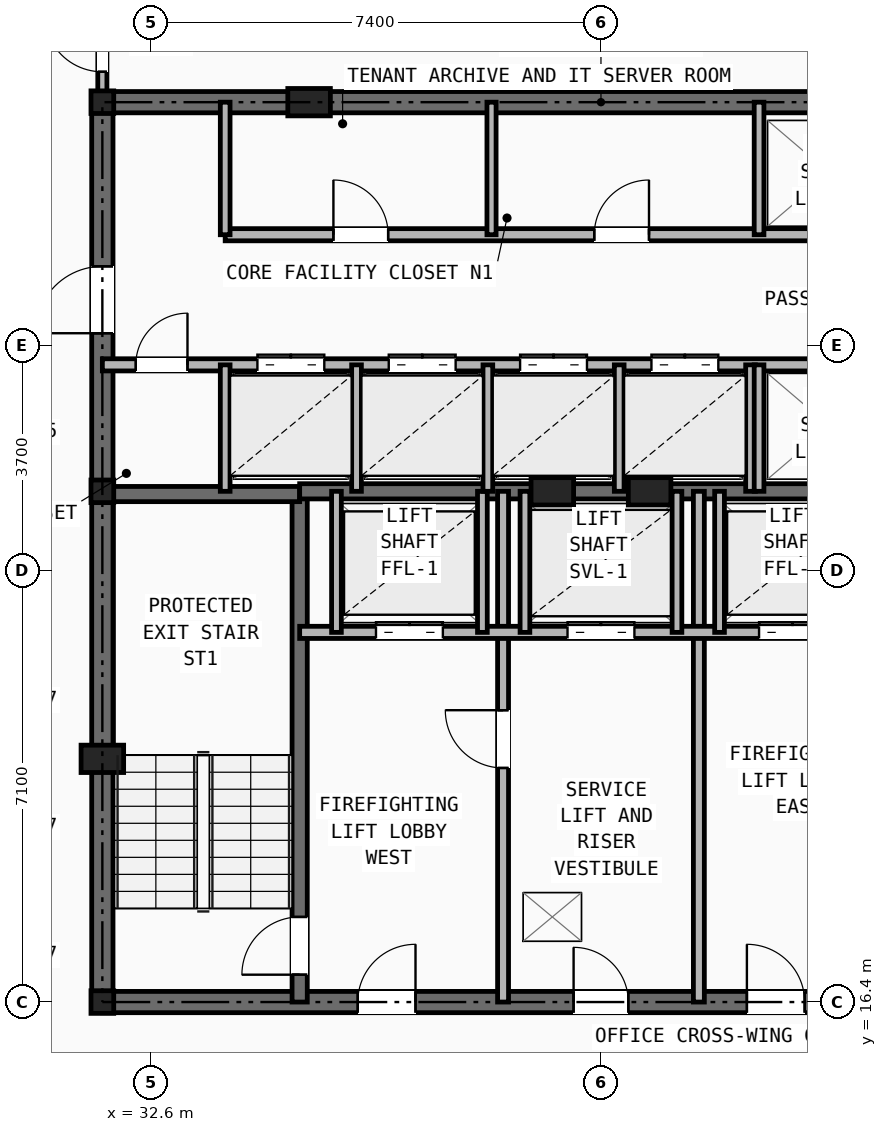
"""IFC4 building model, lengths in metres.
Left out: names, types, materials, properties, quantities, classifications, styles, units other than length and angle.
Written with IfcOpenShell. Run it as: python <this file> out.ifc"""

import sys

from ifc_helpers import new_model, si_unit, direction, frame, frame_2d, origin, origin_2d, place, context, subcontext, project, spatial, rectangle, i_section, extrude, element, fill, save


model = new_model("IFC4")
c1 = context("Model", 3, precision=1e-05, world=origin(), true_north=direction((0.0, 1.0)))
c2 = subcontext(c1, "Body", "Model", "MODEL_VIEW")
j1 = project(units=[si_unit("LENGTHUNIT", "METRE"), si_unit("PLANEANGLEUNIT", "RADIAN")], contexts=[c1])
p1 = place(None, origin())
s1 = spatial("IfcSite", under=j1, at=p1, CompositionType="ELEMENT")
p2 = place(p1, origin())
s2 = spatial("IfcBuilding", under=s1, at=p2, CompositionType="ELEMENT")
p3 = place(p2, frame((0.0, 0.0, 189.6)))
s3 = spatial("IfcBuildingStorey", under=s2, at=p3, CompositionType="ELEMENT", Elevation=189.6)
for number, where, z_axis, x_axis in (
    (1, (31.8, 16.4, 0.0), (0.0, 0.0, 1.0), (1.0, 0.0, 0.0)),
    (2, (31.8, 24.8, 0.0), (0.0, 0.0, 1.0), (1.0, 0.0, 0.0)),
    (3, (31.8, 31.2, 0.0), (0.0, 0.0, 1.0), (1.0, 0.0, 0.0)),
):
    element("IfcColumn", number, at=place(p3, frame(where, z_axis=z_axis, x_axis=x_axis)), inside=s3, PredefinedType="COLUMN", context=c2, shape_type="SweptSolid", body=[
        extrude(i_section(OverallWidth=0.374, OverallDepth=0.372, WebThickness=0.016, FlangeThickness=0.026, at=origin_2d()), origin(), (0.0, 0.0, 1.0), 3.45),
    ])
for number, where, z_axis, x_axis in (
    (4, (31.8, 20.4, 0.0), (0.0, 0.0, 1.0), (1.0, 0.0, 0.0)),
    (5, (35.2, 31.2, 0.0), (0.0, 0.0, 1.0), (1.0, 0.0, 0.0)),
    (6, (39.2, 24.8, 0.0), (0.0, 0.0, 1.0), (1.0, 0.0, 0.0)),
    (7, (40.8, 24.8, 0.0), (0.0, 0.0, 1.0), (1.0, 0.0, 0.0)),
):
    element("IfcColumn", number, at=place(p3, frame(where, z_axis=z_axis, x_axis=x_axis)), inside=s3, PredefinedType="PILASTER", context=c2, shape_type="SweptSolid", body=[
        extrude(rectangle(XDim=0.7, YDim=0.45, at=origin_2d()), origin(), (0.0, 0.0, 1.0), 3.45),
    ])
p4 = place(p3, frame((31.8, 16.4, 0.0), z_axis=(0.0, 0.0, 1.0), x_axis=(1.0, 0.0, 0.0)))
e8 = element("IfcWall", 8, at=p4, inside=s3, PredefinedType="SHEAR", context=c2, shape_type="SweptSolid", body=[
    extrude(rectangle(XDim=16.4, YDim=0.35, at=frame_2d((8.2, 0.0))), origin(), (0.0, 0.0, 1.0), 3.21),
])
p5 = place(p4, frame((7.75, 0.0, 0.0)))
e9 = element("IfcOpeningElement", 9, at=p5, cuts=e8, PredefinedType="OPENING", context=c2, shape_type="SweptSolid", body=[
    extrude(rectangle(XDim=0.9, YDim=2.1, at=frame_2d((0.45, 1.05))), frame((0.0, 0.185, 0.0), z_axis=(0.0, -1.0, 0.0), x_axis=(1.0, 0.0, 0.0)), (0.0, 0.0, 1.0), 0.37),
])
p6 = place(p4, frame((4.2, 0.0, 0.0)))
e10 = element("IfcOpeningElement", 10, at=p6, cuts=e8, PredefinedType="OPENING", context=c2, shape_type="SweptSolid", body=[
    extrude(rectangle(XDim=0.95, YDim=2.1, at=frame_2d((0.475, 1.05))), frame((0.0, 0.185, 0.0), z_axis=(0.0, -1.0, 0.0), x_axis=(1.0, 0.0, 0.0)), (0.0, 0.0, 1.0), 0.37),
])
p7 = place(p4, frame((10.6, 0.0, 0.0)))
e11 = element("IfcOpeningElement", 11, at=p7, cuts=e8, PredefinedType="OPENING", context=c2, shape_type="SweptSolid", body=[
    extrude(rectangle(XDim=0.95, YDim=2.1, at=frame_2d((0.475, 1.05))), frame((0.0, 0.185, 0.0), z_axis=(0.0, -1.0, 0.0), x_axis=(1.0, 0.0, 0.0)), (0.0, 0.0, 1.0), 0.37),
])
p8 = place(p3, frame((31.8, 31.2, 0.0), z_axis=(0.0, 0.0, 1.0), x_axis=(1.0, 0.0, 0.0)))
e12 = element("IfcWall", 12, at=p8, inside=s3, PredefinedType="SHEAR", context=c2, shape_type="SweptSolid", body=[
    extrude(rectangle(XDim=16.4, YDim=0.35, at=frame_2d((8.2, 0.0))), origin(), (0.0, 0.0, 1.0), 3.21),
])
p9 = place(p3, frame((31.8, 16.4, 0.0), z_axis=(0.0, 0.0, 1.0), x_axis=(0.0, 1.0, 0.0)))
e13 = element("IfcWall", 13, at=p9, inside=s3, PredefinedType="SHEAR", context=c2, shape_type="SweptSolid", body=[
    extrude(rectangle(XDim=14.8, YDim=0.35, at=frame_2d((7.4, 0.0))), origin(), (0.0, 0.0, 1.0), 3.21),
])
p10 = place(p9, frame((11.0, 0.0, 0.0)))
e14 = element("IfcOpeningElement", 14, at=p10, cuts=e13, PredefinedType="OPENING", context=c2, shape_type="SweptSolid", body=[
    extrude(rectangle(XDim=1.1, YDim=2.15, at=frame_2d((0.55, 1.075))), frame((0.0, 0.185, 0.0), z_axis=(0.0, -1.0, 0.0), x_axis=(1.0, 0.0, 0.0)), (0.0, 0.0, 1.0), 0.37),
])
p11 = place(p3, frame((35.045, 16.4, 0.0), z_axis=(0.0, 0.0, 1.0), x_axis=(0.0, 1.0, 0.0)))
e15 = element("IfcWall", 15, at=p11, inside=s3, PredefinedType="SHEAR", context=c2, shape_type="SweptSolid", body=[
    extrude(rectangle(XDim=8.4, YDim=0.25, at=frame_2d((4.2, 0.0))), origin(), (0.0, 0.0, 1.0), 3.21),
])
p12 = place(p11, frame((0.45, 0.0, 0.0)))
e16 = element("IfcOpeningElement", 16, at=p12, cuts=e15, PredefinedType="OPENING", context=c2, shape_type="SweptSolid", body=[
    extrude(rectangle(XDim=0.95, YDim=2.1, at=frame_2d((0.475, 1.05))), frame((0.0, 0.135, 0.0), z_axis=(0.0, -1.0, 0.0), x_axis=(1.0, 0.0, 0.0)), (0.0, 0.0, 1.0), 0.27),
])
p13 = place(p3, frame((31.8, 24.755, 0.0), z_axis=(0.0, 0.0, 1.0), x_axis=(1.0, 0.0, 0.0)))
e17 = element("IfcWall", 17, at=p13, inside=s3, PredefinedType="SHEAR", context=c2, shape_type="SweptSolid", body=[
    extrude(rectangle(XDim=3.245, YDim=0.25, at=frame_2d((1.623, 0.0))), origin(), (0.0, 0.0, 1.0), 3.21),
])
p14 = place(p3, frame((35.045, 24.8, 0.0), z_axis=(0.0, 0.0, 1.0), x_axis=(1.0, 0.0, 0.0)))
e18 = element("IfcWall", 18, at=p14, inside=s3, PredefinedType="SHEAR", context=c2, shape_type="SweptSolid", body=[
    extrude(rectangle(XDim=9.91, YDim=0.25, at=frame_2d((4.955, 0.0))), origin(), (0.0, 0.0, 1.0), 3.21),
])
p15 = place(p3, frame((38.39, 16.4, 0.0), z_axis=(0.0, 0.0, 1.0), x_axis=(0.0, 1.0, 0.0)))
e19 = element("IfcWall", 19, at=p15, inside=s3, PredefinedType="PARTITIONING", context=c2, shape_type="SweptSolid", body=[
    extrude(rectangle(XDim=8.4, YDim=0.18, at=frame_2d((4.2, 0.0))), origin(), (0.0, 0.0, 1.0), 2.665),
])
p16 = place(p15, frame((3.85, 0.0, 0.0)))
e20 = element("IfcOpeningElement", 20, at=p16, cuts=e19, PredefinedType="OPENING", context=c2, shape_type="SweptSolid", body=[
    extrude(rectangle(XDim=0.95, YDim=2.1, at=frame_2d((0.475, 1.05))), frame((0.0, 0.1, 0.0), z_axis=(0.0, -1.0, 0.0), x_axis=(1.0, 0.0, 0.0)), (0.0, 0.0, 1.0), 0.2),
])
p17 = place(p3, frame((41.61, 16.4, 0.0), z_axis=(0.0, 0.0, 1.0), x_axis=(0.0, 1.0, 0.0)))
e21 = element("IfcWall", 21, at=p17, inside=s3, PredefinedType="PARTITIONING", context=c2, shape_type="SweptSolid", body=[
    extrude(rectangle(XDim=8.4, YDim=0.18, at=frame_2d((4.2, 0.0))), origin(), (0.0, 0.0, 1.0), 2.665),
])
p18 = place(p3, frame((35.045, 22.48, 0.0), z_axis=(0.0, 0.0, 1.0), x_axis=(1.0, 0.0, 0.0)))
e22 = element("IfcWall", 22, at=p18, inside=s3, PredefinedType="SOLIDWALL", context=c2, shape_type="SweptSolid", body=[
    extrude(rectangle(XDim=9.91, YDim=0.2, at=frame_2d((4.955, 0.0))), origin(), (0.0, 0.0, 1.0), 3.21),
])
p19 = place(p18, frame((1.255, 0.0, 0.0)))
e23 = element("IfcOpeningElement", 23, at=p19, cuts=e22, PredefinedType="OPENING", context=c2, shape_type="SweptSolid", body=[
    extrude(rectangle(XDim=1.1, YDim=2.15, at=frame_2d((0.55, 1.075))), frame((0.0, 0.11, 0.0), z_axis=(0.0, -1.0, 0.0), x_axis=(1.0, 0.0, 0.0)), (0.0, 0.0, 1.0), 0.22),
])
p20 = place(p18, frame((7.555, 0.0, 0.0)))
e24 = element("IfcOpeningElement", 24, at=p20, cuts=e22, PredefinedType="OPENING", context=c2, shape_type="SweptSolid", body=[
    extrude(rectangle(XDim=1.1, YDim=2.15, at=frame_2d((0.55, 1.075))), frame((0.0, 0.11, 0.0), z_axis=(0.0, -1.0, 0.0), x_axis=(1.0, 0.0, 0.0)), (0.0, 0.0, 1.0), 0.22),
])
p21 = place(p18, frame((4.405, 0.0, 0.0)))
e25 = element("IfcOpeningElement", 25, at=p21, cuts=e22, PredefinedType="OPENING", context=c2, shape_type="SweptSolid", body=[
    extrude(rectangle(XDim=1.1, YDim=2.15, at=frame_2d((0.55, 1.075))), frame((0.0, 0.11, 0.0), z_axis=(0.0, -1.0, 0.0), x_axis=(1.0, 0.0, 0.0)), (0.0, 0.0, 1.0), 0.22),
])
for number, where, z_axis, x_axis in (
    (26, (35.65, 22.48, 0.0), (0.0, 0.0, 1.0), (0.0, 1.0, 0.0)),
    (27, (38.05, 22.48, 0.0), (0.0, 0.0, 1.0), (0.0, 1.0, 0.0)),
    (28, (41.95, 22.48, 0.0), (0.0, 0.0, 1.0), (0.0, 1.0, 0.0)),
    (29, (38.75, 22.48, 0.0), (0.0, 0.0, 1.0), (0.0, 1.0, 0.0)),
    (30, (41.25, 22.48, 0.0), (0.0, 0.0, 1.0), (0.0, 1.0, 0.0)),
):
    element("IfcWall", number, at=place(p3, frame(where, z_axis=z_axis, x_axis=x_axis)), inside=s3, PredefinedType="SOLIDWALL", context=c2, shape_type="SweptSolid", body=[
        extrude(rectangle(XDim=2.32, YDim=0.16, at=frame_2d((1.16, 0.0))), origin(), (0.0, 0.0, 1.0), 3.21),
    ])
p22 = place(p3, frame((33.82, 29.02, 0.0), z_axis=(0.0, 0.0, 1.0), x_axis=(1.0, 0.0, 0.0)))
e31 = element("IfcWall", 31, at=p22, inside=s3, PredefinedType="SOLIDWALL", context=c2, shape_type="SweptSolid", body=[
    extrude(rectangle(XDim=14.38, YDim=0.2, at=frame_2d((7.19, 0.0))), origin(), (0.0, 0.0, 1.0), 2.665),
])
p23 = place(p22, frame((1.78, 0.0, 0.0)))
e32 = element("IfcOpeningElement", 32, at=p23, cuts=e31, PredefinedType="OPENING", context=c2, shape_type="SweptSolid", body=[
    extrude(rectangle(XDim=0.9, YDim=2.1, at=frame_2d((0.45, 1.05))), frame((0.0, 0.11, 0.0), z_axis=(0.0, -1.0, 0.0), x_axis=(1.0, 0.0, 0.0)), (0.0, 0.0, 1.0), 0.22),
])
p24 = place(p22, frame((6.07, 0.0, 0.0)))
e33 = element("IfcOpeningElement", 33, at=p24, cuts=e31, PredefinedType="OPENING", context=c2, shape_type="SweptSolid", body=[
    extrude(rectangle(XDim=0.9, YDim=2.1, at=frame_2d((0.45, 1.05))), frame((0.0, 0.11, 0.0), z_axis=(0.0, -1.0, 0.0), x_axis=(1.0, 0.0, 0.0)), (0.0, 0.0, 1.0), 0.22),
])
p25 = place(p3, frame((31.8, 26.88, 0.0), z_axis=(0.0, 0.0, 1.0), x_axis=(1.0, 0.0, 0.0)))
e34 = element("IfcWall", 34, at=p25, inside=s3, PredefinedType="SOLIDWALL", context=c2, shape_type="SweptSolid", body=[
    extrude(rectangle(XDim=16.4, YDim=0.2, at=frame_2d((8.2, 0.0))), origin(), (0.0, 0.0, 1.0), 2.665),
])
p26 = place(p25, frame((0.55, 0.0, 0.0)))
e35 = element("IfcOpeningElement", 35, at=p26, cuts=e34, PredefinedType="OPENING", context=c2, shape_type="SweptSolid", body=[
    extrude(rectangle(XDim=0.85, YDim=2.05, at=frame_2d((0.425, 1.025))), frame((0.0, 0.11, 0.0), z_axis=(0.0, -1.0, 0.0), x_axis=(1.0, 0.0, 0.0)), (0.0, 0.0, 1.0), 0.22),
])
p27 = place(p25, frame((2.55, 0.0, 0.0)))
e36 = element("IfcOpeningElement", 36, at=p27, cuts=e34, PredefinedType="OPENING", context=c2, shape_type="SweptSolid", body=[
    extrude(rectangle(XDim=1.1, YDim=2.15, at=frame_2d((0.55, 1.075))), frame((0.0, 0.11, 0.0), z_axis=(0.0, -1.0, 0.0), x_axis=(1.0, 0.0, 0.0)), (0.0, 0.0, 1.0), 0.22),
])
p28 = place(p25, frame((4.71, 0.0, 0.0)))
e37 = element("IfcOpeningElement", 37, at=p28, cuts=e34, PredefinedType="OPENING", context=c2, shape_type="SweptSolid", body=[
    extrude(rectangle(XDim=1.1, YDim=2.15, at=frame_2d((0.55, 1.075))), frame((0.0, 0.11, 0.0), z_axis=(0.0, -1.0, 0.0), x_axis=(1.0, 0.0, 0.0)), (0.0, 0.0, 1.0), 0.22),
])
p29 = place(p25, frame((6.87, 0.0, 0.0)))
e38 = element("IfcOpeningElement", 38, at=p29, cuts=e34, PredefinedType="OPENING", context=c2, shape_type="SweptSolid", body=[
    extrude(rectangle(XDim=1.1, YDim=2.15, at=frame_2d((0.55, 1.075))), frame((0.0, 0.11, 0.0), z_axis=(0.0, -1.0, 0.0), x_axis=(1.0, 0.0, 0.0)), (0.0, 0.0, 1.0), 0.22),
])
p30 = place(p25, frame((9.03, 0.0, 0.0)))
e39 = element("IfcOpeningElement", 39, at=p30, cuts=e34, PredefinedType="OPENING", context=c2, shape_type="SweptSolid", body=[
    extrude(rectangle(XDim=1.1, YDim=2.15, at=frame_2d((0.55, 1.075))), frame((0.0, 0.11, 0.0), z_axis=(0.0, -1.0, 0.0), x_axis=(1.0, 0.0, 0.0)), (0.0, 0.0, 1.0), 0.22),
])
p31 = place(p3, frame((33.82, 29.02, 0.0), z_axis=(0.0, 0.0, 1.0), x_axis=(0.0, 1.0, 0.0)))
e40 = element("IfcWall", 40, at=p31, inside=s3, PredefinedType="SOLIDWALL", context=c2, shape_type="SweptSolid", body=[
    extrude(rectangle(XDim=2.18, YDim=0.16, at=frame_2d((1.09, 0.0))), origin(), (0.0, 0.0, 1.0), 2.665),
])
p32 = place(p3, frame((33.82, 24.8, 0.0), z_axis=(0.0, 0.0, 1.0), x_axis=(0.0, 1.0, 0.0)))
e41 = element("IfcWall", 41, at=p32, inside=s3, PredefinedType="SOLIDWALL", context=c2, shape_type="SweptSolid", body=[
    extrude(rectangle(XDim=2.08, YDim=0.16, at=frame_2d((1.04, 0.0))), origin(), (0.0, 0.0, 1.0), 3.21),
])
p33 = place(p3, frame((38.2, 29.02, 0.0), z_axis=(0.0, 0.0, 1.0), x_axis=(0.0, 1.0, 0.0)))
e42 = element("IfcWall", 42, at=p33, inside=s3, PredefinedType="PARTITIONING", context=c2, shape_type="SweptSolid", body=[
    extrude(rectangle(XDim=2.18, YDim=0.15, at=frame_2d((1.09, 0.0))), origin(), (0.0, 0.0, 1.0), 2.665),
])
for number, where, z_axis, x_axis in (
    (43, (35.98, 24.8, 0.0), (0.0, 0.0, 1.0), (0.0, 1.0, 0.0)),
    (44, (38.14, 24.8, 0.0), (0.0, 0.0, 1.0), (0.0, 1.0, 0.0)),
    (45, (40.3, 24.8, 0.0), (0.0, 0.0, 1.0), (0.0, 1.0, 0.0)),
    (46, (42.46, 24.8, 0.0), (0.0, 0.0, 1.0), (0.0, 1.0, 0.0)),
):
    element("IfcWall", number, at=place(p3, frame(where, z_axis=z_axis, x_axis=x_axis)), inside=s3, PredefinedType="SOLIDWALL", context=c2, shape_type="SweptSolid", body=[
        extrude(rectangle(XDim=2.08, YDim=0.16, at=frame_2d((1.04, 0.0))), origin(), (0.0, 0.0, 1.0), 3.21),
    ])
p34 = place(p3, frame((42.6, 29.02, 0.0), z_axis=(0.0, 0.0, 1.0), x_axis=(0.0, 1.0, 0.0)))
e47 = element("IfcWall", 47, at=p34, inside=s3, PredefinedType="SOLIDWALL", context=c2, shape_type="SweptSolid", body=[
    extrude(rectangle(XDim=2.18, YDim=0.16, at=frame_2d((1.09, 0.0))), origin(), (0.0, 0.0, 1.0), 2.665),
])
p35 = place(p3, frame((42.6, 24.8, 0.0), z_axis=(0.0, 0.0, 1.0), x_axis=(0.0, 1.0, 0.0)))
e48 = element("IfcWall", 48, at=p35, inside=s3, PredefinedType="SOLIDWALL", context=c2, shape_type="SweptSolid", body=[
    extrude(rectangle(XDim=2.08, YDim=0.16, at=frame_2d((1.04, 0.0))), origin(), (0.0, 0.0, 1.0), 3.21),
])
p36 = place(p3, frame((31.8, 31.2, 0.0), z_axis=(0.0, 0.0, 1.0), x_axis=(0.0, 1.0, 0.0)))
e49 = element("IfcWall", 49, at=p36, inside=s3, PredefinedType="PARTITIONING", context=c2, shape_type="SweptSolid", body=[
    extrude(rectangle(XDim=5.3, YDim=0.15, at=frame_2d((2.65, 0.0))), origin(), (0.0, 0.0, 1.0), 2.225),
])
p37 = place(p36, frame((0.5, 0.0, 0.0)))
e50 = element("IfcOpeningElement", 50, at=p37, cuts=e49, PredefinedType="OPENING", context=c2, shape_type="SweptSolid", body=[
    extrude(rectangle(XDim=0.95, YDim=2.1, at=frame_2d((0.475, 1.05))), frame((0.0, 0.085, 0.0), z_axis=(0.0, -1.0, 0.0), x_axis=(1.0, 0.0, 0.0)), (0.0, 0.0, 1.0), 0.17),
])
p38 = place(p5, origin())
e51 = element("IfcDoor", 51, at=p38, inside=s3, OperationType="SINGLE_SWING_LEFT", PredefinedType="DOOR", context=c2, shape_type="SweptSolid", body=[
    extrude(rectangle(XDim=0.9, YDim=2.1, at=frame_2d((0.45, 1.05))), frame((0.0, 0.025, 0.0), z_axis=(0.0, -1.0, 0.0), x_axis=(1.0, 0.0, 0.0)), (0.0, 0.0, 1.0), 0.05),
])
fill(e9, e51)
p39 = place(p16, origin())
e52 = element("IfcDoor", 52, at=p39, inside=s3, OperationType="SINGLE_SWING_RIGHT", PredefinedType="DOOR", context=c2, shape_type="SweptSolid", body=[
    extrude(rectangle(XDim=0.95, YDim=2.1, at=frame_2d((0.475, 1.05))), frame((0.0, 0.025, 0.0), z_axis=(0.0, -1.0, 0.0), x_axis=(1.0, 0.0, 0.0)), (0.0, 0.0, 1.0), 0.05),
])
fill(e20, e52)
p40 = place(p12, origin())
e53 = element("IfcDoor", 53, at=p40, inside=s3, OperationType="SINGLE_SWING_LEFT", PredefinedType="DOOR", context=c2, shape_type="SweptSolid", body=[
    extrude(rectangle(XDim=0.95, YDim=2.1, at=frame_2d((0.475, 1.05))), frame((0.0, 0.025, 0.0), z_axis=(0.0, -1.0, 0.0), x_axis=(1.0, 0.0, 0.0)), (0.0, 0.0, 1.0), 0.05),
])
fill(e16, e53)
p41 = place(p6, origin())
e54 = element("IfcDoor", 54, at=p41, inside=s3, OperationType="SINGLE_SWING_RIGHT", PredefinedType="DOOR", context=c2, shape_type="SweptSolid", body=[
    extrude(rectangle(XDim=0.95, YDim=2.1, at=frame_2d((0.475, 1.05))), frame((0.0, 0.025, 0.0), z_axis=(0.0, -1.0, 0.0), x_axis=(1.0, 0.0, 0.0)), (0.0, 0.0, 1.0), 0.05),
])
fill(e10, e54)
p42 = place(p7, origin())
e55 = element("IfcDoor", 55, at=p42, inside=s3, OperationType="SINGLE_SWING_LEFT", PredefinedType="DOOR", context=c2, shape_type="SweptSolid", body=[
    extrude(rectangle(XDim=0.95, YDim=2.1, at=frame_2d((0.475, 1.05))), frame((0.0, 0.025, 0.0), z_axis=(0.0, -1.0, 0.0), x_axis=(1.0, 0.0, 0.0)), (0.0, 0.0, 1.0), 0.05),
])
fill(e11, e55)
p43 = place(p19, origin())
e56 = element("IfcDoor", 56, at=p43, inside=s3, OperationType="DOUBLE_DOOR_SLIDING", PredefinedType="DOOR", context=c2, shape_type="SweptSolid", body=[
    extrude(rectangle(XDim=1.1, YDim=2.15, at=frame_2d((0.55, 1.075))), frame((0.0, 0.025, 0.0), z_axis=(0.0, -1.0, 0.0), x_axis=(1.0, 0.0, 0.0)), (0.0, 0.0, 1.0), 0.05),
])
fill(e23, e56)
p44 = place(p20, origin())
e57 = element("IfcDoor", 57, at=p44, inside=s3, OperationType="DOUBLE_DOOR_SLIDING", PredefinedType="DOOR", context=c2, shape_type="SweptSolid", body=[
    extrude(rectangle(XDim=1.1, YDim=2.15, at=frame_2d((0.55, 1.075))), frame((0.0, 0.025, 0.0), z_axis=(0.0, -1.0, 0.0), x_axis=(1.0, 0.0, 0.0)), (0.0, 0.0, 1.0), 0.05),
])
fill(e24, e57)
p45 = place(p21, origin())
e58 = element("IfcDoor", 58, at=p45, inside=s3, OperationType="DOUBLE_DOOR_SLIDING", PredefinedType="DOOR", context=c2, shape_type="SweptSolid", body=[
    extrude(rectangle(XDim=1.1, YDim=2.15, at=frame_2d((0.55, 1.075))), frame((0.0, 0.025, 0.0), z_axis=(0.0, -1.0, 0.0), x_axis=(1.0, 0.0, 0.0)), (0.0, 0.0, 1.0), 0.05),
])
fill(e25, e58)
p46 = place(p26, origin())
e59 = element("IfcDoor", 59, at=p46, inside=s3, OperationType="SINGLE_SWING_RIGHT", PredefinedType="DOOR", context=c2, shape_type="SweptSolid", body=[
    extrude(rectangle(XDim=0.85, YDim=2.05, at=frame_2d((0.425, 1.025))), frame((0.0, 0.025, 0.0), z_axis=(0.0, -1.0, 0.0), x_axis=(1.0, 0.0, 0.0)), (0.0, 0.0, 1.0), 0.05),
])
fill(e35, e59)
p47 = place(p10, origin())
e60 = element("IfcDoor", 60, at=p47, inside=s3, OperationType="SINGLE_SWING_LEFT", PredefinedType="DOOR", context=c2, shape_type="SweptSolid", body=[
    extrude(rectangle(XDim=1.1, YDim=2.15, at=frame_2d((0.55, 1.075))), frame((0.0, 0.025, 0.0), z_axis=(0.0, -1.0, 0.0), x_axis=(1.0, 0.0, 0.0)), (0.0, 0.0, 1.0), 0.05),
])
fill(e14, e60)
p48 = place(p23, origin())
e61 = element("IfcDoor", 61, at=p48, inside=s3, OperationType="SINGLE_SWING_LEFT", PredefinedType="DOOR", context=c2, shape_type="SweptSolid", body=[
    extrude(rectangle(XDim=0.9, YDim=2.1, at=frame_2d((0.45, 1.05))), frame((0.0, 0.025, 0.0), z_axis=(0.0, -1.0, 0.0), x_axis=(1.0, 0.0, 0.0)), (0.0, 0.0, 1.0), 0.05),
])
fill(e32, e61)
p49 = place(p24, origin())
e62 = element("IfcDoor", 62, at=p49, inside=s3, OperationType="SINGLE_SWING_RIGHT", PredefinedType="DOOR", context=c2, shape_type="SweptSolid", body=[
    extrude(rectangle(XDim=0.9, YDim=2.1, at=frame_2d((0.45, 1.05))), frame((0.0, 0.025, 0.0), z_axis=(0.0, -1.0, 0.0), x_axis=(1.0, 0.0, 0.0)), (0.0, 0.0, 1.0), 0.05),
])
fill(e33, e62)
p50 = place(p27, origin())
e63 = element("IfcDoor", 63, at=p50, inside=s3, OperationType="DOUBLE_DOOR_SLIDING", PredefinedType="DOOR", context=c2, shape_type="SweptSolid", body=[
    extrude(rectangle(XDim=1.1, YDim=2.15, at=frame_2d((0.55, 1.075))), frame((0.0, 0.025, 0.0), z_axis=(0.0, -1.0, 0.0), x_axis=(1.0, 0.0, 0.0)), (0.0, 0.0, 1.0), 0.05),
])
fill(e36, e63)
p51 = place(p28, origin())
e64 = element("IfcDoor", 64, at=p51, inside=s3, OperationType="DOUBLE_DOOR_SLIDING", PredefinedType="DOOR", context=c2, shape_type="SweptSolid", body=[
    extrude(rectangle(XDim=1.1, YDim=2.15, at=frame_2d((0.55, 1.075))), frame((0.0, 0.025, 0.0), z_axis=(0.0, -1.0, 0.0), x_axis=(1.0, 0.0, 0.0)), (0.0, 0.0, 1.0), 0.05),
])
fill(e37, e64)
p52 = place(p29, origin())
e65 = element("IfcDoor", 65, at=p52, inside=s3, OperationType="DOUBLE_DOOR_SLIDING", PredefinedType="DOOR", context=c2, shape_type="SweptSolid", body=[
    extrude(rectangle(XDim=1.1, YDim=2.15, at=frame_2d((0.55, 1.075))), frame((0.0, 0.025, 0.0), z_axis=(0.0, -1.0, 0.0), x_axis=(1.0, 0.0, 0.0)), (0.0, 0.0, 1.0), 0.05),
])
fill(e38, e65)
p53 = place(p30, origin())
e66 = element("IfcDoor", 66, at=p53, inside=s3, OperationType="DOUBLE_DOOR_SLIDING", PredefinedType="DOOR", context=c2, shape_type="SweptSolid", body=[
    extrude(rectangle(XDim=1.1, YDim=2.15, at=frame_2d((0.55, 1.075))), frame((0.0, 0.025, 0.0), z_axis=(0.0, -1.0, 0.0), x_axis=(1.0, 0.0, 0.0)), (0.0, 0.0, 1.0), 0.05),
])
fill(e39, e66)
p54 = place(p37, origin())
e67 = element("IfcDoor", 67, at=p54, inside=s3, OperationType="SINGLE_SWING_RIGHT", PredefinedType="DOOR", context=c2, shape_type="SweptSolid", body=[
    extrude(rectangle(XDim=0.95, YDim=2.1, at=frame_2d((0.475, 1.05))), frame((0.0, 0.025, 0.0), z_axis=(0.0, -1.0, 0.0), x_axis=(1.0, 0.0, 0.0)), (0.0, 0.0, 1.0), 0.05),
])
fill(e50, e67)
save(model, sys.argv[1])
